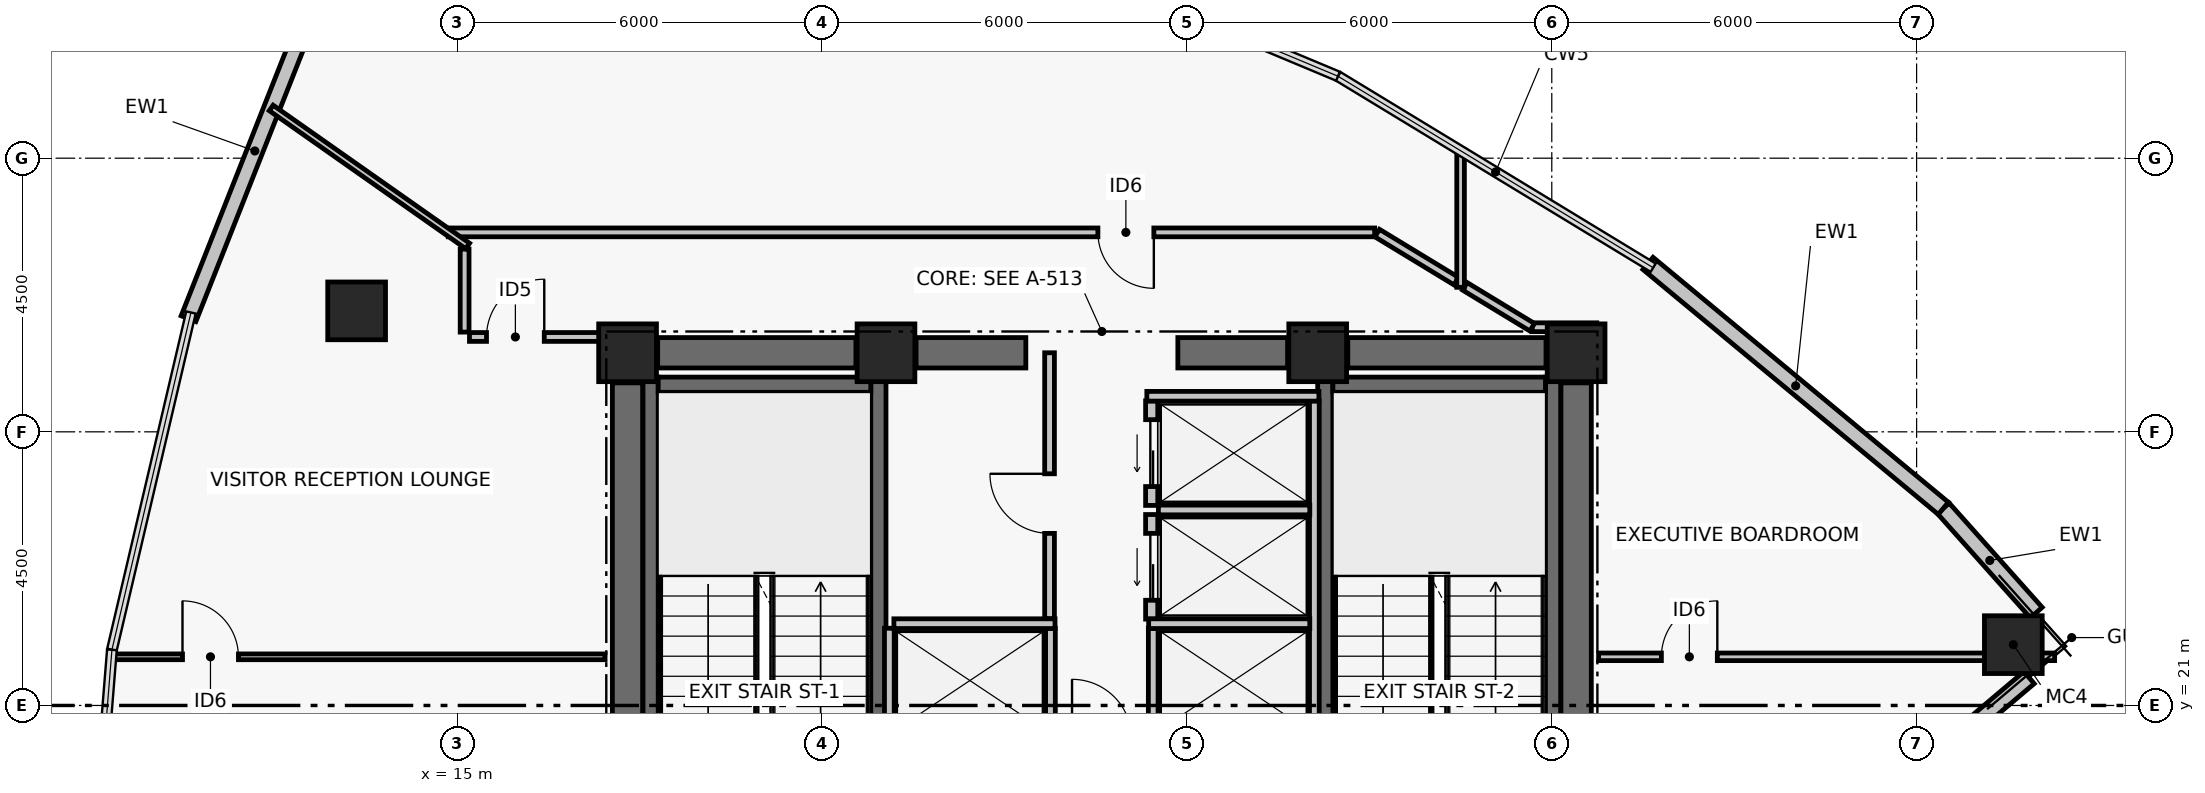
"""IFC4 building model, lengths in metres.
Left out: names, types, materials, properties, quantities, classifications, styles, units other than length and angle.
Written with IfcOpenShell. Run it as: python <this file> out.ifc"""

import sys

from ifc_helpers import new_model, si_unit, direction, frame, frame_2d, origin, origin_2d, place, context, subcontext, project, spatial, rectangle, hollow_rectangle, extrude, element, fill, save


model = new_model("IFC4")
c1 = context("Model", 3, precision=1e-05, world=origin(), true_north=direction((0.0, 1.0)))
c2 = subcontext(c1, "Body", "Model", "MODEL_VIEW")
j1 = project(units=[si_unit("LENGTHUNIT", "METRE"), si_unit("PLANEANGLEUNIT", "RADIAN")], contexts=[c1])
p1 = place(None, origin())
s1 = spatial("IfcSite", under=j1, at=p1, CompositionType="ELEMENT")
p2 = place(p1, origin())
s2 = spatial("IfcBuilding", under=s1, at=p2, CompositionType="ELEMENT")
p3 = place(p2, frame((0.0, 0.0, 172.92)))
s3 = spatial("IfcBuildingStorey", under=s2, at=p3, CompositionType="ELEMENT", Elevation=172.92)
for number, where, z_axis, x_axis in (
    (1, (17.8, 26.8, 0.0), (0.0, 0.0, 1.0), (1.0, 0.0, 0.0)),
    (2, (22.05, 26.8, 0.0), (0.0, 0.0, 1.0), (1.0, 0.0, 0.0)),
    (3, (29.15, 26.8, 0.0), (0.0, 0.0, 1.0), (1.0, 0.0, 0.0)),
    (4, (33.4, 26.8, 0.0), (0.0, 0.0, 1.0), (1.0, 0.0, 0.0)),
):
    element("IfcColumn", number, at=place(p3, frame(where, z_axis=z_axis, x_axis=x_axis)), inside=s3, PredefinedType="COLUMN", context=c2, shape_type="SweptSolid", body=[
        extrude(rectangle(XDim=0.95, YDim=0.95, at=origin_2d()), origin(), (0.0, 0.0, 1.0), 3.72),
    ])
p4 = place(p3, frame((18.295, 26.8, 0.0), z_axis=(0.0, 0.0, 1.0), x_axis=(1.0, 0.0, 0.0)))
e5 = element("IfcWall", 5, at=p4, inside=s3, PredefinedType="SHEAR", context=c2, shape_type="SweptSolid", body=[
    extrude(rectangle(XDim=3.26, YDim=0.5, at=frame_2d((1.63, 0.0))), origin(), (0.0, 0.0, 1.0), 3.5),
])
p5 = place(p3, frame((22.545, 26.8, 0.0), z_axis=(0.0, 0.0, 1.0), x_axis=(1.0, 0.0, 0.0)))
e6 = element("IfcWall", 6, at=p5, inside=s3, PredefinedType="SHEAR", context=c2, shape_type="SweptSolid", body=[
    extrude(rectangle(XDim=1.805, YDim=0.5, at=frame_2d((0.903, 0.0))), origin(), (0.0, 0.0, 1.0), 3.5),
])
p6 = place(p3, frame((26.85, 26.8, 0.0), z_axis=(0.0, 0.0, 1.0), x_axis=(1.0, 0.0, 0.0)))
e7 = element("IfcWall", 7, at=p6, inside=s3, PredefinedType="SHEAR", context=c2, shape_type="SweptSolid", body=[
    extrude(rectangle(XDim=1.805, YDim=0.5, at=frame_2d((0.902, 0.0))), origin(), (0.0, 0.0, 1.0), 3.5),
])
p7 = place(p3, frame((29.645, 26.8, 0.0), z_axis=(0.0, 0.0, 1.0), x_axis=(1.0, 0.0, 0.0)))
e8 = element("IfcWall", 8, at=p7, inside=s3, PredefinedType="SHEAR", context=c2, shape_type="SweptSolid", body=[
    extrude(rectangle(XDim=3.26, YDim=0.5, at=frame_2d((1.63, 0.0))), origin(), (0.0, 0.0, 1.0), 3.5),
])
for number, where, z_axis, x_axis in (
    (9, (17.8, 17.695, 0.0), (0.0, 0.0, 1.0), (0.0, 1.0, 0.0)),
    (10, (33.4, 17.695, 0.0), (0.0, 0.0, 1.0), (0.0, 1.0, 0.0)),
):
    element("IfcWall", number, at=place(p3, frame(where, z_axis=z_axis, x_axis=x_axis)), inside=s3, PredefinedType="SHEAR", context=c2, shape_type="SweptSolid", body=[
        extrude(rectangle(XDim=8.61, YDim=0.5, at=frame_2d((4.305, 0.0))), origin(), (0.0, 0.0, 1.0), 3.5),
    ])
p8 = place(p3, frame((18.179, 17.6, 0.0), z_axis=(0.0, 0.0, 1.0), x_axis=(0.0, 1.0, 0.0)))
e11 = element("IfcWall", 11, at=p8, inside=s3, PredefinedType="SHEAR", context=c2, shape_type="SweptSolid", body=[
    extrude(rectangle(XDim=8.8, YDim=0.25, at=frame_2d((4.4, 0.0))), origin(), (0.0, 0.0, 1.0), 3.5),
])
p9 = place(p3, frame((21.925, 17.6, 0.0), z_axis=(0.0, 0.0, 1.0), x_axis=(0.0, 1.0, 0.0)))
e12 = element("IfcWall", 12, at=p9, inside=s3, PredefinedType="SHEAR", context=c2, shape_type="SweptSolid", body=[
    extrude(rectangle(XDim=8.8, YDim=0.25, at=frame_2d((4.4, 0.0))), origin(), (0.0, 0.0, 1.0), 3.5),
])
p10 = place(p9, frame((0.35, 0.0, 0.0)))
e13 = element("IfcOpeningElement", 13, at=p10, cuts=e12, PredefinedType="OPENING", context=c2, shape_type="SweptSolid", body=[
    extrude(rectangle(XDim=1.05, YDim=2.08, at=frame_2d((0.525, 1.04))), frame((0.0, 0.135, 0.0), z_axis=(0.0, -1.0, 0.0), x_axis=(1.0, 0.0, 0.0)), (0.0, 0.0, 1.0), 0.27),
])
p11 = place(p3, frame((18.304, 26.275, 0.0), z_axis=(0.0, 0.0, 1.0), x_axis=(1.0, 0.0, 0.0)))
e14 = element("IfcWall", 14, at=p11, inside=s3, PredefinedType="SHEAR", context=c2, shape_type="SweptSolid", body=[
    extrude(rectangle(XDim=3.496, YDim=0.25, at=frame_2d((1.748, 0.0))), origin(), (0.0, 0.0, 1.0), 3.5),
])
p12 = place(p3, frame((29.275, 17.6, 0.0), z_axis=(0.0, 0.0, 1.0), x_axis=(0.0, 1.0, 0.0)))
e15 = element("IfcWall", 15, at=p12, inside=s3, PredefinedType="SHEAR", context=c2, shape_type="SweptSolid", body=[
    extrude(rectangle(XDim=8.8, YDim=0.25, at=frame_2d((4.4, 0.0))), origin(), (0.0, 0.0, 1.0), 3.5),
])
p13 = place(p12, frame((0.35, 0.0, 0.0)))
e16 = element("IfcOpeningElement", 16, at=p13, cuts=e15, PredefinedType="OPENING", context=c2, shape_type="SweptSolid", body=[
    extrude(rectangle(XDim=1.05, YDim=2.08, at=frame_2d((0.525, 1.04))), frame((0.0, 0.135, 0.0), z_axis=(0.0, -1.0, 0.0), x_axis=(1.0, 0.0, 0.0)), (0.0, 0.0, 1.0), 0.27),
])
p14 = place(p3, frame((33.021, 17.6, 0.0), z_axis=(0.0, 0.0, 1.0), x_axis=(0.0, 1.0, 0.0)))
e17 = element("IfcWall", 17, at=p14, inside=s3, PredefinedType="SHEAR", context=c2, shape_type="SweptSolid", body=[
    extrude(rectangle(XDim=8.8, YDim=0.25, at=frame_2d((4.4, 0.0))), origin(), (0.0, 0.0, 1.0), 3.5),
])
p15 = place(p3, frame((29.4, 26.275, 0.0), z_axis=(0.0, 0.0, 1.0), x_axis=(1.0, 0.0, 0.0)))
e18 = element("IfcWall", 18, at=p15, inside=s3, PredefinedType="SHEAR", context=c2, shape_type="SweptSolid", body=[
    extrude(rectangle(XDim=3.496, YDim=0.25, at=frame_2d((1.748, 0.0))), origin(), (0.0, 0.0, 1.0), 3.5),
])
for number, where, z_axis, x_axis in (
    (19, (40.591, 22.0, 0.0), (0.0, 0.0, 1.0), (1.0, 0.0, 0.0)),
    (20, (13.344, 27.489, 0.0), (0.0, 0.0, 1.0), (1.0, 0.0, 0.0)),
):
    element("IfcColumn", number, at=place(p3, frame(where, z_axis=z_axis, x_axis=x_axis)), inside=s3, PredefinedType="COLUMN", context=c2, shape_type="SweptSolid", body=[
        extrude(hollow_rectangle(XDim=0.95, YDim=0.95, WallThickness=0.04, at=origin_2d()), origin(), (0.0, 0.0, 1.0), 3.72),
    ])
p16 = place(p3, frame((40.85, 21.458, 0.0), z_axis=(0.0, 0.0, 1.0), x_axis=(-0.763472391034, -0.645840466469, 0.0)))
e21 = element("IfcWall", 21, at=p16, inside=s3, PredefinedType="PARTITIONING", context=c2, shape_type="SweptSolid", body=[
    extrude(rectangle(XDim=2.904, YDim=0.26, at=frame_2d((1.452, 0.0))), origin(), (0.0, 0.0, 1.0), 3.5),
])
p17 = place(p3, frame((39.439, 24.242, 0.0), z_axis=(0.0, 0.0, 1.0), x_axis=(0.665576459686, -0.746329669993, 0.0)))
e22 = element("IfcWall", 22, at=p17, inside=s3, PredefinedType="PARTITIONING", context=c2, shape_type="SweptSolid", body=[
    extrude(rectangle(XDim=2.298, YDim=0.26, at=frame_2d((1.149, 0.0))), origin(), (0.0, 0.0, 1.0), 3.5),
])
p18 = place(p3, frame((34.583, 28.27, 0.0), z_axis=(0.0, 0.0, 1.0), x_axis=(0.769770017655, -0.638321329676, 0.0)))
e23 = element("IfcWall", 23, at=p18, inside=s3, PredefinedType="PARTITIONING", context=c2, shape_type="SweptSolid", body=[
    extrude(rectangle(XDim=6.309, YDim=0.26, at=frame_2d((3.155, 0.0))), origin(), (0.0, 0.0, 1.0), 3.5),
])
p19 = place(p3, frame((10.579, 27.36, 0.0), z_axis=(0.0, 0.0, 1.0), x_axis=(0.367819433119, 0.929897233365, 0.0)))
e24 = element("IfcWall", 24, at=p19, inside=s3, PredefinedType="PARTITIONING", context=c2, shape_type="SweptSolid", body=[
    extrude(rectangle(XDim=5.933, YDim=0.26, at=frame_2d((2.967, 0.0))), origin(), (0.0, 0.0, 1.0), 3.5),
])
p20 = place(p3, frame((26.42, 22.42, 0.0), z_axis=(0.0, 0.0, 1.0), x_axis=(0.0, 1.0, 0.0)))
e25 = element("IfcWall", 25, at=p20, inside=s3, PredefinedType="PARTITIONING", context=c2, shape_type="SweptSolid", body=[
    extrude(rectangle(XDim=1.72, YDim=0.2, at=frame_2d((0.86, 0.0))), origin(), (0.0, 0.0, 1.0), 3.5),
])
p21 = place(p20, frame((0.31, 0.0, 0.0)))
e26 = element("IfcOpeningElement", 26, at=p21, cuts=e25, PredefinedType="OPENING", context=c2, shape_type="SweptSolid", body=[
    extrude(rectangle(XDim=1.1, YDim=2.08, at=frame_2d((0.55, 1.04))), frame((0.0, 0.11, 0.0), z_axis=(0.0, -1.0, 0.0), x_axis=(1.0, 0.0, 0.0)), (0.0, 0.0, 1.0), 0.22),
])
p22 = place(p3, frame((26.42, 24.29, 0.0), z_axis=(0.0, 0.0, 1.0), x_axis=(0.0, 1.0, 0.0)))
e27 = element("IfcWall", 27, at=p22, inside=s3, PredefinedType="PARTITIONING", context=c2, shape_type="SweptSolid", body=[
    extrude(rectangle(XDim=1.72, YDim=0.2, at=frame_2d((0.86, 0.0))), origin(), (0.0, 0.0, 1.0), 3.5),
])
p23 = place(p22, frame((0.31, 0.0, 0.0)))
e28 = element("IfcOpeningElement", 28, at=p23, cuts=e27, PredefinedType="OPENING", context=c2, shape_type="SweptSolid", body=[
    extrude(rectangle(XDim=1.1, YDim=2.08, at=frame_2d((0.55, 1.04))), frame((0.0, 0.11, 0.0), z_axis=(0.0, -1.0, 0.0), x_axis=(1.0, 0.0, 0.0)), (0.0, 0.0, 1.0), 0.22),
])
for number, where, z_axis, x_axis in (
    (29, (22.105, 20.56, 0.0), (0.0, 0.0, 1.0), (0.0, 1.0, 0.0)),
    (30, (24.755, 20.56, 0.0), (0.0, 0.0, 1.0), (0.0, 1.0, 0.0)),
):
    element("IfcWall", number, at=place(p3, frame(where, z_axis=z_axis, x_axis=x_axis)), inside=s3, PredefinedType="PARTITIONING", context=c2, shape_type="SweptSolid", body=[
        extrude(rectangle(XDim=1.71, YDim=0.16, at=frame_2d((0.855, 0.0))), origin(), (0.0, 0.0, 1.0), 3.5),
    ])
p24 = place(p3, frame((22.18, 22.345, 0.0), z_axis=(0.0, 0.0, 1.0), x_axis=(1.0, 0.0, 0.0)))
e31 = element("IfcWall", 31, at=p24, inside=s3, PredefinedType="PARTITIONING", context=c2, shape_type="SweptSolid", body=[
    extrude(rectangle(XDim=2.65, YDim=0.16, at=frame_2d((1.325, 0.0))), origin(), (0.0, 0.0, 1.0), 3.5),
])
p25 = place(p3, frame((29.095, 20.56, 0.0), z_axis=(0.0, 0.0, 1.0), x_axis=(0.0, 1.0, 0.0)))
e32 = element("IfcWall", 32, at=p25, inside=s3, PredefinedType="PARTITIONING", context=c2, shape_type="SweptSolid", body=[
    extrude(rectangle(XDim=5.45, YDim=0.16, at=frame_2d((2.725, 0.0))), origin(), (0.0, 0.0, 1.0), 3.5),
])
p26 = place(p3, frame((26.445, 20.56, 0.0), z_axis=(0.0, 0.0, 1.0), x_axis=(0.0, 1.0, 0.0)))
e33 = element("IfcWall", 33, at=p26, inside=s3, PredefinedType="PARTITIONING", context=c2, shape_type="SweptSolid", body=[
    extrude(rectangle(XDim=1.71, YDim=0.16, at=frame_2d((0.855, 0.0))), origin(), (0.0, 0.0, 1.0), 3.5),
])
p27 = place(p3, frame((26.37, 22.345, 0.0), z_axis=(0.0, 0.0, 1.0), x_axis=(1.0, 0.0, 0.0)))
e34 = element("IfcWall", 34, at=p27, inside=s3, PredefinedType="PARTITIONING", context=c2, shape_type="SweptSolid", body=[
    extrude(rectangle(XDim=2.65, YDim=0.16, at=frame_2d((1.325, 0.0))), origin(), (0.0, 0.0, 1.0), 3.5),
])
p28 = place(p3, frame((26.53, 24.215, 0.0), z_axis=(0.0, 0.0, 1.0), x_axis=(1.0, 0.0, 0.0)))
e35 = element("IfcWall", 35, at=p28, inside=s3, PredefinedType="PARTITIONING", context=c2, shape_type="SweptSolid", body=[
    extrude(rectangle(XDim=2.49, YDim=0.16, at=frame_2d((1.245, 0.0))), origin(), (0.0, 0.0, 1.0), 3.5),
])
p29 = place(p3, frame((26.34, 26.085, 0.0), z_axis=(0.0, 0.0, 1.0), x_axis=(1.0, 0.0, 0.0)))
e36 = element("IfcWall", 36, at=p29, inside=s3, PredefinedType="PARTITIONING", context=c2, shape_type="SweptSolid", body=[
    extrude(rectangle(XDim=2.83, YDim=0.16, at=frame_2d((1.415, 0.0))), origin(), (0.0, 0.0, 1.0), 3.5),
])
p30 = place(p3, frame((24.74, 22.43, 0.0), z_axis=(0.0, 0.0, 1.0), x_axis=(0.0, 1.0, 0.0)))
e37 = element("IfcWall", 37, at=p30, inside=s3, PredefinedType="PARTITIONING", context=c2, shape_type="SweptSolid", body=[
    extrude(rectangle(XDim=4.37, YDim=0.16, at=frame_2d((2.185, 0.0))), origin(), (0.0, 0.0, 1.0), 2.63),
])
p31 = place(p30, frame((1.4, 0.0, 0.0)))
e38 = element("IfcOpeningElement", 38, at=p31, cuts=e37, PredefinedType="OPENING", context=c2, shape_type="SweptSolid", body=[
    extrude(rectangle(XDim=0.98, YDim=2.06, at=frame_2d((0.49, 1.03))), frame((0.0, 0.09, 0.0), z_axis=(0.0, -1.0, 0.0), x_axis=(1.0, 0.0, 0.0)), (0.0, 0.0, 1.0), 0.18),
])
p32 = place(p3, frame((33.74, 27.22, 0.0), z_axis=(0.0, 0.0, 1.0), x_axis=(-1.0, 0.0, 0.0)))
e39 = element("IfcWall", 39, at=p32, inside=s3, PredefinedType="PARTITIONING", context=c2, shape_type="SweptSolid", body=[
    extrude(rectangle(XDim=1.062, YDim=0.145, at=frame_2d((0.531, 0.0))), origin(), (0.0, 0.0, 1.0), 2.63),
])
p33 = place(p3, frame((32.677, 27.22, 0.0), z_axis=(0.0, 0.0, 1.0), x_axis=(-0.854620308946, 0.51925343286, 0.0)))
e40 = element("IfcWall", 40, at=p33, inside=s3, PredefinedType="PARTITIONING", context=c2, shape_type="SweptSolid", body=[
    extrude(rectangle(XDim=1.296, YDim=0.145, at=frame_2d((0.648, 0.0))), origin(), (0.0, 0.0, 1.0), 2.63),
])
p34 = place(p3, frame((31.43, 27.978, 0.0), z_axis=(0.0, 0.0, 1.0), x_axis=(-0.854650301125, 0.519204066612, 0.0)))
e41 = element("IfcWall", 41, at=p34, inside=s3, PredefinedType="PARTITIONING", context=c2, shape_type="SweptSolid", body=[
    extrude(rectangle(XDim=1.522, YDim=0.145, at=frame_2d((0.761, 0.0))), origin(), (0.0, 0.0, 1.0), 2.93),
])
p35 = place(p3, frame((30.087, 28.78, 0.0), z_axis=(0.0, 0.0, 1.0), x_axis=(-1.0, 0.0, 0.0)))
e42 = element("IfcWall", 42, at=p35, inside=s3, PredefinedType="PARTITIONING", context=c2, shape_type="SweptSolid", body=[
    extrude(rectangle(XDim=15.236, YDim=0.145, at=frame_2d((7.618, 0.0))), origin(), (0.0, 0.0, 1.0), 2.73),
])
p36 = place(p35, frame((3.632, 0.0, 0.0)))
e43 = element("IfcOpeningElement", 43, at=p36, cuts=e42, PredefinedType="OPENING", context=c2, shape_type="SweptSolid", body=[
    extrude(rectangle(XDim=0.92, YDim=2.05, at=frame_2d((0.46, 1.025))), frame((0.0, 0.083, 0.0), z_axis=(0.0, -1.0, 0.0), x_axis=(1.0, 0.0, 0.0)), (0.0, 0.0, 1.0), 0.165),
])
p37 = place(p3, frame((15.12, 28.506, 0.0), z_axis=(0.0, 0.0, 1.0), x_axis=(0.0, -1.0, 0.0)))
e44 = element("IfcWall", 44, at=p37, inside=s3, PredefinedType="PARTITIONING", context=c2, shape_type="SweptSolid", body=[
    extrude(rectangle(XDim=1.366, YDim=0.145, at=frame_2d((0.683, 0.0))), origin(), (0.0, 0.0, 1.0), 2.73),
])
p38 = place(p3, frame((15.2, 27.06, 0.0), z_axis=(0.0, 0.0, 1.0), x_axis=(1.0, 0.0, 0.0)))
e45 = element("IfcWall", 45, at=p38, inside=s3, PredefinedType="PARTITIONING", context=c2, shape_type="SweptSolid", body=[
    extrude(rectangle(XDim=2.18, YDim=0.145, at=frame_2d((1.09, 0.0))), origin(), (0.0, 0.0, 1.0), 2.73),
])
p39 = place(p38, frame((0.28, 0.0, 0.0)))
e46 = element("IfcOpeningElement", 46, at=p39, cuts=e45, PredefinedType="OPENING", context=c2, shape_type="SweptSolid", body=[
    extrude(rectangle(XDim=0.95, YDim=2.06, at=frame_2d((0.475, 1.03))), frame((0.0, 0.083, 0.0), z_axis=(0.0, -1.0, 0.0), x_axis=(1.0, 0.0, 0.0)), (0.0, 0.0, 1.0), 0.165),
])
p40 = place(p3, frame((31.5, 27.877, 0.0), z_axis=(0.0, 0.0, 1.0), x_axis=(0.0, 1.0, 0.0)))
e47 = element("IfcWall", 47, at=p40, inside=s3, PredefinedType="PARTITIONING", context=c2, shape_type="SweptSolid", body=[
    extrude(rectangle(XDim=2.258, YDim=0.125, at=frame_2d((1.129, 0.0))), origin(), (0.0, 0.0, 1.0), 2.93),
])
p41 = place(p3, frame((9.3, 21.8, 0.0), z_axis=(0.0, 0.0, 1.0), x_axis=(1.0, 0.0, 0.0)))
e48 = element("IfcWall", 48, at=p41, inside=s3, PredefinedType="PARTITIONING", context=c2, shape_type="SweptSolid", body=[
    extrude(rectangle(XDim=8.13, YDim=0.095, at=frame_2d((4.065, 0.0))), origin(), (0.0, 0.0, 1.0), 2.63),
])
p42 = place(p41, frame((1.18, 0.0, 0.0)))
e49 = element("IfcOpeningElement", 49, at=p42, cuts=e48, PredefinedType="OPENING", context=c2, shape_type="SweptSolid", body=[
    extrude(rectangle(XDim=0.92, YDim=2.05, at=frame_2d((0.46, 1.025))), frame((0.0, 0.057, 0.0), z_axis=(0.0, -1.0, 0.0), x_axis=(1.0, 0.0, 0.0)), (0.0, 0.0, 1.0), 0.115),
])
p43 = place(p3, frame((33.77, 21.8, 0.0), z_axis=(0.0, 0.0, 1.0), x_axis=(1.0, 0.0, 0.0)))
e50 = element("IfcWall", 50, at=p43, inside=s3, PredefinedType="PARTITIONING", context=c2, shape_type="SweptSolid", body=[
    extrude(rectangle(XDim=7.5, YDim=0.125, at=frame_2d((3.75, 0.0))), origin(), (0.0, 0.0, 1.0), 2.63),
])
p44 = place(p43, frame((1.032, 0.0, 0.0)))
e51 = element("IfcOpeningElement", 51, at=p44, cuts=e50, PredefinedType="OPENING", context=c2, shape_type="SweptSolid", body=[
    extrude(rectangle(XDim=0.92, YDim=2.05, at=frame_2d((0.46, 1.025))), frame((0.0, 0.073, 0.0), z_axis=(0.0, -1.0, 0.0), x_axis=(1.0, 0.0, 0.0)), (0.0, 0.0, 1.0), 0.145),
])
p45 = place(p3, frame((11.939, 30.826, 0.0), z_axis=(0.0, 0.0, 1.0), x_axis=(0.81818776637, -0.574951110063, 0.0)))
e52 = element("IfcWall", 52, at=p45, inside=s3, PredefinedType="PARTITIONING", context=c2, shape_type="SweptSolid", body=[
    extrude(rectangle(XDim=3.949, YDim=0.11, at=frame_2d((1.974, 0.0))), origin(), (0.0, 0.0, 1.0), 2.93),
])
p46 = place(p21, origin())
e53 = element("IfcDoor", 53, at=p46, inside=s3, OperationType="DOUBLE_DOOR_SLIDING", PredefinedType="DOOR", context=c2, shape_type="SweptSolid", body=[
    extrude(rectangle(XDim=1.1, YDim=2.08, at=frame_2d((0.55, 1.04))), frame((0.0, 0.025, 0.0), z_axis=(0.0, -1.0, 0.0), x_axis=(1.0, 0.0, 0.0)), (0.0, 0.0, 1.0), 0.05),
])
fill(e26, e53)
p47 = place(p23, origin())
e54 = element("IfcDoor", 54, at=p47, inside=s3, OperationType="DOUBLE_DOOR_SLIDING", PredefinedType="DOOR", context=c2, shape_type="SweptSolid", body=[
    extrude(rectangle(XDim=1.1, YDim=2.08, at=frame_2d((0.55, 1.04))), frame((0.0, 0.025, 0.0), z_axis=(0.0, -1.0, 0.0), x_axis=(1.0, 0.0, 0.0)), (0.0, 0.0, 1.0), 0.05),
])
fill(e28, e54)
p48 = place(p31, origin())
e55 = element("IfcDoor", 55, at=p48, inside=s3, OperationType="SINGLE_SWING_RIGHT", PredefinedType="DOOR", context=c2, shape_type="SweptSolid", body=[
    extrude(rectangle(XDim=0.98, YDim=2.06, at=frame_2d((0.49, 1.03))), frame((0.0, 0.025, 0.0), z_axis=(0.0, -1.0, 0.0), x_axis=(1.0, 0.0, 0.0)), (0.0, 0.0, 1.0), 0.05),
])
fill(e38, e55)
p49 = place(p36, origin())
e56 = element("IfcDoor", 56, at=p49, inside=s3, OperationType="SINGLE_SWING_LEFT", PredefinedType="DOOR", context=c2, shape_type="SweptSolid", body=[
    extrude(rectangle(XDim=0.92, YDim=2.05, at=frame_2d((0.46, 1.025))), frame((0.0, 0.025, 0.0), z_axis=(0.0, -1.0, 0.0), x_axis=(1.0, 0.0, 0.0)), (0.0, 0.0, 1.0), 0.05),
])
fill(e43, e56)
p50 = place(p39, origin())
e57 = element("IfcDoor", 57, at=p50, inside=s3, OperationType="SINGLE_SWING_RIGHT", PredefinedType="DOOR", context=c2, shape_type="SweptSolid", body=[
    extrude(rectangle(XDim=0.95, YDim=2.06, at=frame_2d((0.475, 1.03))), frame((0.0, 0.025, 0.0), z_axis=(0.0, -1.0, 0.0), x_axis=(1.0, 0.0, 0.0)), (0.0, 0.0, 1.0), 0.05),
])
fill(e46, e57)
p51 = place(p42, origin())
e58 = element("IfcDoor", 58, at=p51, inside=s3, OperationType="SINGLE_SWING_LEFT", PredefinedType="DOOR", context=c2, shape_type="SweptSolid", body=[
    extrude(rectangle(XDim=0.92, YDim=2.05, at=frame_2d((0.46, 1.025))), frame((0.0, 0.025, 0.0), z_axis=(0.0, -1.0, 0.0), x_axis=(1.0, 0.0, 0.0)), (0.0, 0.0, 1.0), 0.05),
])
fill(e49, e58)
p52 = place(p44, origin())
e59 = element("IfcDoor", 59, at=p52, inside=s3, OperationType="SINGLE_SWING_RIGHT", PredefinedType="DOOR", context=c2, shape_type="SweptSolid", body=[
    extrude(rectangle(XDim=0.92, YDim=2.05, at=frame_2d((0.46, 1.025))), frame((0.0, 0.025, 0.0), z_axis=(0.0, -1.0, 0.0), x_axis=(1.0, 0.0, 0.0)), (0.0, 0.0, 1.0), 0.05),
])
fill(e51, e59)
save(model, sys.argv[1])
